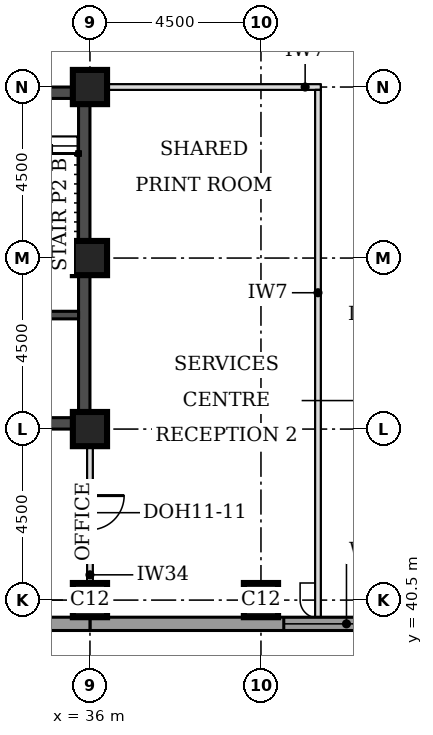
"""IFC4 building model, lengths in metres.
Left out: names, types, materials, properties, quantities, classifications, styles, units other than length and angle.
Written with IfcOpenShell. Run it as: python <this file> out.ifc"""

import sys

from ifc_helpers import new_model, si_unit, direction, frame, frame_2d, origin, origin_2d, place, context, subcontext, project, spatial, rectangle, extrude, element, fill, save


model = new_model("IFC4")
c1 = context("Model", 3, precision=1e-05, world=origin(), true_north=direction((0.0, 1.0)))
c2 = subcontext(c1, "Body", "Model", "MODEL_VIEW")
j1 = project(units=[si_unit("LENGTHUNIT", "METRE"), si_unit("PLANEANGLEUNIT", "RADIAN")], contexts=[c1])
p1 = place(None, origin())
s1 = spatial("IfcSite", under=j1, at=p1, CompositionType="ELEMENT")
p2 = place(p1, origin())
s2 = spatial("IfcBuilding", under=s1, at=p2, CompositionType="ELEMENT")
p3 = place(p2, frame((0.0, 0.0, 237.8)))
s3 = spatial("IfcBuildingStorey", under=s2, at=p3, CompositionType="ELEMENT", Elevation=237.8)
for number, where, z_axis, x_axis in (
    (1, (36.0, 40.5, 0.0), (0.0, 0.0, 1.0), (1.0, 0.0, 0.0)),
    (2, (40.5, 40.5, 0.0), (0.0, 0.0, 1.0), (1.0, 0.0, 0.0)),
    (3, (36.0, 45.0, 0.0), (0.0, 0.0, 1.0), (1.0, 0.0, 0.0)),
    (4, (36.0, 49.5, 0.0), (0.0, 0.0, 1.0), (1.0, 0.0, 0.0)),
    (5, (36.0, 54.0, 0.0), (0.0, 0.0, 1.0), (1.0, 0.0, 0.0)),
):
    element("IfcColumn", number, at=place(p3, frame(where, z_axis=z_axis, x_axis=x_axis)), inside=s3, PredefinedType="COLUMN", context=c2, shape_type="SweptSolid", body=[
        extrude(rectangle(XDim=0.9, YDim=0.9, at=origin_2d()), origin(), (0.0, 0.0, 1.0), 3.7),
    ])
p4 = place(p3, frame((27.3, 45.15, 0.0), z_axis=(0.0, 0.0, 1.0), x_axis=(1.0, 0.0, 0.0)))
e6 = element("IfcWall", 6, at=p4, inside=s3, PredefinedType="SHEAR", context=c2, shape_type="SweptSolid", body=[
    extrude(rectangle(XDim=8.4, YDim=0.3, at=frame_2d((4.2, 0.0))), origin(), (0.0, 0.0, 1.0), 3.7),
])
p5 = place(p4, frame((5.2, 0.0, 0.0)))
e7 = element("IfcOpeningElement", 7, at=p5, cuts=e6, PredefinedType="OPENING", context=c2, shape_type="SweptSolid", body=[
    extrude(rectangle(XDim=1.0, YDim=2.1, at=frame_2d((0.5, 1.05))), frame((0.0, 0.16, 0.0), z_axis=(0.0, -1.0, 0.0), x_axis=(1.0, 0.0, 0.0)), (0.0, 0.0, 1.0), 0.32),
])
p6 = place(p3, frame((27.3, 53.85, 0.0), z_axis=(0.0, 0.0, 1.0), x_axis=(1.0, 0.0, 0.0)))
e8 = element("IfcWall", 8, at=p6, inside=s3, PredefinedType="SHEAR", context=c2, shape_type="SweptSolid", body=[
    extrude(rectangle(XDim=8.4, YDim=0.3, at=frame_2d((4.2, 0.0))), origin(), (0.0, 0.0, 1.0), 3.7),
])
p7 = place(p6, frame((6.4, 0.0, 0.0)))
e9 = element("IfcOpeningElement", 9, at=p7, cuts=e8, PredefinedType="OPENING", context=c2, shape_type="SweptSolid", body=[
    extrude(rectangle(XDim=1.1, YDim=2.1, at=frame_2d((0.55, 1.05))), frame((0.0, 0.16, 0.0), z_axis=(0.0, -1.0, 0.0), x_axis=(1.0, 0.0, 0.0)), (0.0, 0.0, 1.0), 0.32),
])
p8 = place(p3, frame((35.85, 45.0, 0.0), z_axis=(0.0, 0.0, 1.0), x_axis=(0.0, 1.0, 0.0)))
e10 = element("IfcWall", 10, at=p8, inside=s3, PredefinedType="SHEAR", context=c2, shape_type="SweptSolid", body=[
    extrude(rectangle(XDim=9.0, YDim=0.3, at=frame_2d((4.5, 0.0))), origin(), (0.0, 0.0, 1.0), 3.7),
])
p9 = place(p3, frame((36.0, 39.875, 0.0), z_axis=(0.0, 0.0, 1.0), x_axis=(1.0, 0.0, 0.0)))
e11 = element("IfcWall", 11, at=p9, inside=s3, PredefinedType="STANDARD", context=c2, shape_type="SweptSolid", body=[
    extrude(rectangle(XDim=36.331, YDim=0.35, at=frame_2d((18.166, 0.0))), origin(), (0.0, 0.0, 1.0), 3.525),
])
p10 = place(p9, frame((5.1, 0.0, 0.9)))
e12 = element("IfcOpeningElement", 12, at=p10, cuts=e11, PredefinedType="OPENING", context=c2, shape_type="SweptSolid", body=[
    extrude(rectangle(XDim=3.3, YDim=1.9, at=frame_2d((1.65, 0.95))), frame((0.0, 0.185, 0.0), z_axis=(0.0, -1.0, 0.0), x_axis=(1.0, 0.0, 0.0)), (0.0, 0.0, 1.0), 0.37),
])
p11 = place(p9, frame((9.6, 0.0, 0.9)))
e13 = element("IfcOpeningElement", 13, at=p11, cuts=e11, PredefinedType="OPENING", context=c2, shape_type="SweptSolid", body=[
    extrude(rectangle(XDim=3.3, YDim=1.9, at=frame_2d((1.65, 0.95))), frame((0.0, 0.185, 0.0), z_axis=(0.0, -1.0, 0.0), x_axis=(1.0, 0.0, 0.0)), (0.0, 0.0, 1.0), 0.37),
])
p12 = place(p9, frame((14.1, 0.0, 0.9)))
e14 = element("IfcOpeningElement", 14, at=p12, cuts=e11, PredefinedType="OPENING", context=c2, shape_type="SweptSolid", body=[
    extrude(rectangle(XDim=3.3, YDim=1.9, at=frame_2d((1.65, 0.95))), frame((0.0, 0.185, 0.0), z_axis=(0.0, -1.0, 0.0), x_axis=(1.0, 0.0, 0.0)), (0.0, 0.0, 1.0), 0.37),
])
p13 = place(p9, frame((18.6, 0.0, 0.9)))
e15 = element("IfcOpeningElement", 15, at=p13, cuts=e11, PredefinedType="OPENING", context=c2, shape_type="SweptSolid", body=[
    extrude(rectangle(XDim=3.3, YDim=1.9, at=frame_2d((1.65, 0.95))), frame((0.0, 0.185, 0.0), z_axis=(0.0, -1.0, 0.0), x_axis=(1.0, 0.0, 0.0)), (0.0, 0.0, 1.0), 0.37),
])
p14 = place(p9, frame((23.1, 0.0, 0.9)))
e16 = element("IfcOpeningElement", 16, at=p14, cuts=e11, PredefinedType="OPENING", context=c2, shape_type="SweptSolid", body=[
    extrude(rectangle(XDim=3.3, YDim=1.9, at=frame_2d((1.65, 0.95))), frame((0.0, 0.185, 0.0), z_axis=(0.0, -1.0, 0.0), x_axis=(1.0, 0.0, 0.0)), (0.0, 0.0, 1.0), 0.37),
])
p15 = place(p9, frame((27.6, 0.0, 0.9)))
e17 = element("IfcOpeningElement", 17, at=p15, cuts=e11, PredefinedType="OPENING", context=c2, shape_type="SweptSolid", body=[
    extrude(rectangle(XDim=3.3, YDim=1.9, at=frame_2d((1.65, 0.95))), frame((0.0, 0.185, 0.0), z_axis=(0.0, -1.0, 0.0), x_axis=(1.0, 0.0, 0.0)), (0.0, 0.0, 1.0), 0.37),
])
p16 = place(p3, frame((17.669, 39.875, 0.0), z_axis=(0.0, 0.0, 1.0), x_axis=(1.0, 0.0, 0.0)))
e18 = element("IfcWall", 18, at=p16, inside=s3, PredefinedType="STANDARD", context=c2, shape_type="SweptSolid", body=[
    extrude(rectangle(XDim=18.331, YDim=0.35, at=frame_2d((9.166, 0.0))), origin(), (0.0, 0.0, 1.0), 3.525),
])
p17 = place(p16, frame((5.431, 0.0, 0.9)))
e19 = element("IfcOpeningElement", 19, at=p17, cuts=e18, PredefinedType="OPENING", context=c2, shape_type="SweptSolid", body=[
    extrude(rectangle(XDim=3.3, YDim=1.9, at=frame_2d((1.65, 0.95))), frame((0.0, 0.185, 0.0), z_axis=(0.0, -1.0, 0.0), x_axis=(1.0, 0.0, 0.0)), (0.0, 0.0, 1.0), 0.37),
])
p18 = place(p16, frame((9.931, 0.0, 0.9)))
e20 = element("IfcOpeningElement", 20, at=p18, cuts=e18, PredefinedType="OPENING", context=c2, shape_type="SweptSolid", body=[
    extrude(rectangle(XDim=3.3, YDim=1.9, at=frame_2d((1.65, 0.95))), frame((0.0, 0.185, 0.0), z_axis=(0.0, -1.0, 0.0), x_axis=(1.0, 0.0, 0.0)), (0.0, 0.0, 1.0), 0.37),
])
p19 = place(p3, frame((36.45, 54.0, 0.0), z_axis=(0.0, 0.0, 1.0), x_axis=(1.0, 0.0, 0.0)))
e21 = element("IfcWall", 21, at=p19, inside=s3, PredefinedType="PARTITIONING", context=c2, shape_type="SweptSolid", body=[
    extrude(rectangle(XDim=5.625, YDim=0.15, at=frame_2d((2.812, 0.0))), origin(), (0.0, 0.0, 1.0), 3.55),
])
p20 = place(p3, frame((42.0, 40.05, 0.0), z_axis=(0.0, 0.0, 1.0), x_axis=(0.0, 1.0, 0.0)))
e22 = element("IfcWall", 22, at=p20, inside=s3, PredefinedType="PARTITIONING", context=c2, shape_type="SweptSolid", body=[
    extrude(rectangle(XDim=13.875, YDim=0.15, at=frame_2d((6.938, 0.0))), origin(), (0.0, 0.0, 1.0), 3.55),
])
p21 = place(p3, frame((36.0, 40.95, 0.0), z_axis=(0.0, 0.0, 1.0), x_axis=(0.0, 1.0, 0.0)))
e23 = element("IfcWall", 23, at=p21, inside=s3, PredefinedType="PARTITIONING", context=c2, shape_type="SweptSolid", body=[
    extrude(rectangle(XDim=3.63, YDim=0.15, at=frame_2d((1.815, 0.0))), origin(), (0.0, 0.0, 1.0), 2.8),
])
p22 = place(p21, frame((1.4, 0.0, 0.0)))
e24 = element("IfcOpeningElement", 24, at=p22, cuts=e23, PredefinedType="OPENING", context=c2, shape_type="SweptSolid", body=[
    extrude(rectangle(XDim=0.9, YDim=2.1, at=frame_2d((0.45, 1.05))), frame((0.0, 0.085, 0.0), z_axis=(0.0, -1.0, 0.0), x_axis=(1.0, 0.0, 0.0)), (0.0, 0.0, 1.0), 0.17),
])
p23 = place(p3, frame((32.7, 48.0, 0.0), z_axis=(0.0, 0.0, 1.0), x_axis=(1.0, 0.0, 0.0)))
e25 = element("IfcWall", 25, at=p23, inside=s3, PredefinedType="SOLIDWALL", context=c2, shape_type="SweptSolid", body=[
    extrude(rectangle(XDim=3.0, YDim=0.2, at=frame_2d((1.5, 0.0))), origin(), (0.0, 0.0, 1.0), 3.55),
])
p24 = place(p10, origin())
e26 = element("IfcWindow", 26, at=p24, inside=s3, PartitioningType="SINGLE_PANEL", PredefinedType="WINDOW", context=c2, shape_type="SweptSolid", body=[
    extrude(rectangle(XDim=3.3, YDim=1.9, at=frame_2d((1.65, 0.95))), frame((0.0, 0.085, 0.0), z_axis=(0.0, -1.0, 0.0), x_axis=(1.0, 0.0, 0.0)), (0.0, 0.0, 1.0), 0.06),
])
fill(e12, e26)
p25 = place(p22, frame((0.9, 0.0, 0.0), z_axis=(0.0, 0.0, 1.0), x_axis=(-1.0, 0.0, 0.0)))
e27 = element("IfcDoor", 27, at=p25, inside=s3, OperationType="SINGLE_SWING_LEFT", PredefinedType="DOOR", context=c2, shape_type="SweptSolid", body=[
    extrude(rectangle(XDim=0.9, YDim=2.1, at=frame_2d((0.45, 1.05))), frame((0.0, 0.025, 0.0), z_axis=(0.0, -1.0, 0.0), x_axis=(1.0, 0.0, 0.0)), (0.0, 0.0, 1.0), 0.05),
])
fill(e24, e27)
save(model, sys.argv[1])
